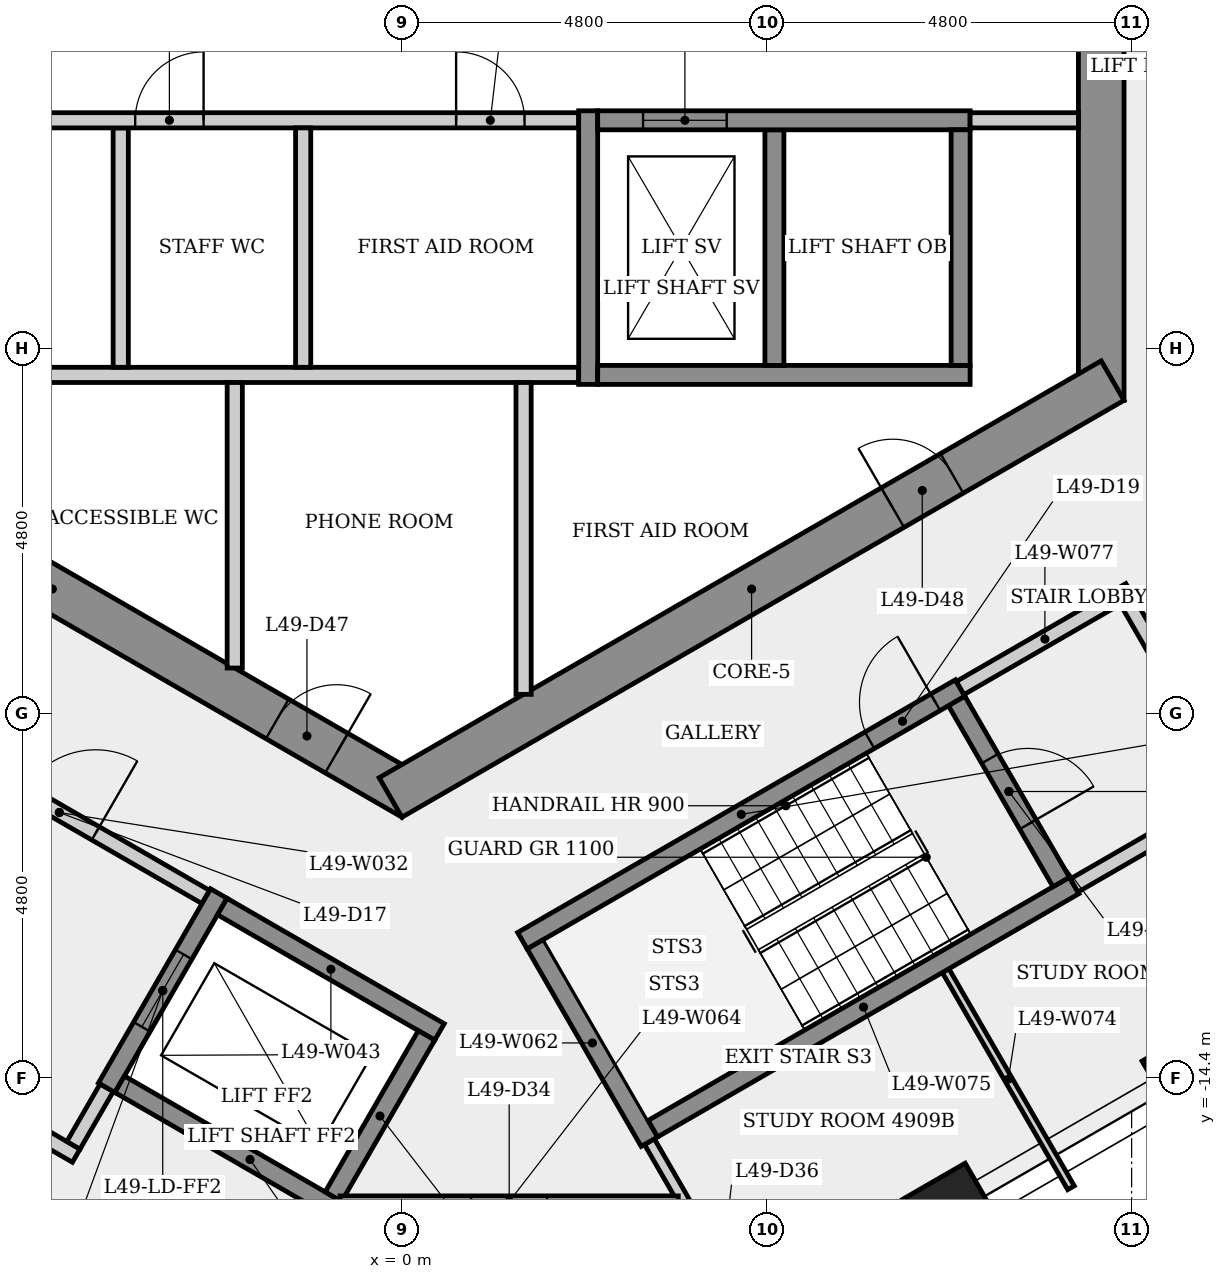
"""IFC4 building model, lengths in metres.
Left out: names, types, materials, properties, quantities, classifications, styles, units other than length and angle.
Written with IfcOpenShell. Run it as: python <this file> out.ifc"""

import sys

from ifc_helpers import new_model, si_unit, direction, frame, frame_2d, origin, origin_2d, place, context, subcontext, project, spatial, rectangle, extrude, element, fill, save


model = new_model("IFC4")
c1 = context("Model", 3, precision=1e-05, world=origin(), true_north=direction((0.0, 1.0)))
c2 = subcontext(c1, "Body", "Model", "MODEL_VIEW")
j1 = project(units=[si_unit("LENGTHUNIT", "METRE"), si_unit("PLANEANGLEUNIT", "RADIAN")], contexts=[c1])
p1 = place(None, origin())
s1 = spatial("IfcSite", under=j1, at=p1, CompositionType="ELEMENT")
p2 = place(p1, origin())
s2 = spatial("IfcBuilding", under=s1, at=p2, CompositionType="ELEMENT")
p3 = place(p2, frame((0.0, 0.0, 183.3)))
s3 = spatial("IfcBuildingStorey", under=s2, at=p3, CompositionType="ELEMENT", Elevation=183.3)
p4 = place(p3, frame((9.2, -5.485, 0.0), z_axis=(0.0, 0.0, 1.0), x_axis=(0.0, 1.0, 0.0)))
e1 = element("IfcWall", 1, at=p4, inside=s3, PredefinedType="SHEAR", context=c2, shape_type="SweptSolid", body=[
    extrude(rectangle(XDim=10.97, YDim=0.6, at=frame_2d((5.485, 0.0))), origin(), (0.0, 0.0, 1.0), 3.4),
])
p5 = place(p4, frame((4.685, 0.0, 0.0)))
e2 = element("IfcOpeningElement", 2, at=p5, cuts=e1, PredefinedType="OPENING", context=c2, shape_type="SweptSolid", body=[
    extrude(rectangle(XDim=1.6, YDim=2.1, at=frame_2d((0.8, 1.05))), frame((0.0, 0.31, 0.0), z_axis=(0.0, -1.0, 0.0), x_axis=(1.0, 0.0, 0.0)), (0.0, 0.0, 1.0), 0.62),
])
p6 = place(p3, frame((-9.35, -5.225, 0.0), z_axis=(0.0, 0.0, 1.0), x_axis=(0.866023993627, -0.500002442456, 0.0)))
e3 = element("IfcWall", 3, at=p6, inside=s3, PredefinedType="SHEAR", context=c2, shape_type="SweptSolid", body=[
    extrude(rectangle(XDim=10.97, YDim=0.6, at=frame_2d((5.485, 0.0))), origin(), (0.0, 0.0, 1.0), 3.4),
])
p7 = place(p6, frame((3.777, 0.0, 0.0)))
e4 = element("IfcOpeningElement", 4, at=p7, cuts=e3, PredefinedType="OPENING", context=c2, shape_type="SweptSolid", body=[
    extrude(rectangle(XDim=0.9, YDim=2.1, at=frame_2d((0.45, 1.05))), frame((0.0, 0.31, 0.0), z_axis=(0.0, -1.0, 0.0), x_axis=(1.0, 0.0, 0.0)), (0.0, 0.0, 1.0), 0.62),
])
p8 = place(p6, frame((8.903, 0.0, 0.0)))
e5 = element("IfcOpeningElement", 5, at=p8, cuts=e3, PredefinedType="OPENING", context=c2, shape_type="SweptSolid", body=[
    extrude(rectangle(XDim=0.9, YDim=2.1, at=frame_2d((0.45, 1.05))), frame((0.0, 0.31, 0.0), z_axis=(0.0, -1.0, 0.0), x_axis=(1.0, 0.0, 0.0)), (0.0, 0.0, 1.0), 0.62),
])
p9 = place(p3, frame((-0.15, -10.71, 0.0), z_axis=(0.0, 0.0, 1.0), x_axis=(0.866023993627, 0.500002442456, 0.0)))
e6 = element("IfcWall", 6, at=p9, inside=s3, PredefinedType="SHEAR", context=c2, shape_type="SweptSolid", body=[
    extrude(rectangle(XDim=10.97, YDim=0.6, at=frame_2d((5.485, 0.0))), origin(), (0.0, 0.0, 1.0), 3.4),
])
p10 = place(p9, frame((7.628, 0.0, 0.0)))
e7 = element("IfcOpeningElement", 7, at=p10, cuts=e6, PredefinedType="OPENING", context=c2, shape_type="SweptSolid", body=[
    extrude(rectangle(XDim=0.9, YDim=2.1, at=frame_2d((0.45, 1.05))), frame((0.0, 0.31, 0.0), z_axis=(0.0, -1.0, 0.0), x_axis=(1.0, 0.0, 0.0)), (0.0, 0.0, 1.0), 0.62),
])
for number, where, z_axis, x_axis in (
    (8, (7.236, -16.171, 0.0), (0.0, 0.0, 1.0), (0.5, -0.866, 0.0)),
    (9, (10.386, -14.352, 0.0), (0.0, 0.0, 1.0), (0.5, -0.866, 0.0)),
):
    element("IfcColumn", number, at=place(p3, frame(where, z_axis=z_axis, x_axis=x_axis)), inside=s3, PredefinedType="COLUMN", context=c2, shape_type="SweptSolid", body=[
        extrude(rectangle(XDim=0.95, YDim=0.95, at=origin_2d()), origin(), (0.0, 0.0, 1.0), 3.4),
    ])
p11 = place(p3, frame((-8.88, -5.15, 0.0), z_axis=(0.0, 0.0, 1.0), x_axis=(1.0, 0.0, 0.0)))
e10 = element("IfcWall", 10, at=p11, inside=s3, PredefinedType="PARTITIONING", context=c2, shape_type="SweptSolid", body=[
    extrude(rectangle(XDim=11.205, YDim=0.2, at=frame_2d((5.603, 0.0))), origin(), (0.0, 0.0, 1.0), 3.0),
])
p12 = place(p3, frame((-8.356, -13.073, 0.0), z_axis=(0.0, 0.0, 1.0), x_axis=(0.866038532462, -0.499977259774, 0.0)))
e11 = element("IfcWall", 11, at=p12, inside=s3, PredefinedType="PARTITIONING", context=c2, shape_type="SweptSolid", body=[
    extrude(rectangle(XDim=4.7, YDim=0.2, at=frame_2d((2.35, 0.0))), origin(), (0.0, 0.0, 1.0), 3.0),
])
p13 = place(p3, frame((-6.435, -9.795, 0.0), z_axis=(0.0, 0.0, 1.0), x_axis=(0.866012907634, -0.500021643343, 0.0)))
e12 = element("IfcWall", 12, at=p13, inside=s3, PredefinedType="PARTITIONING", context=c2, shape_type="SweptSolid", body=[
    extrude(rectangle(XDim=4.45, YDim=0.2, at=frame_2d((2.225, 0.0))), origin(), (0.0, 0.0, 1.0), 3.0),
])
p14 = place(p13, frame((1.675, 0.0, 0.0)))
e13 = element("IfcOpeningElement", 13, at=p14, cuts=e12, PredefinedType="OPENING", context=c2, shape_type="SweptSolid", body=[
    extrude(rectangle(XDim=1.1, YDim=2.1, at=frame_2d((0.55, 1.05))), frame((0.0, 0.11, 0.0), z_axis=(0.0, -1.0, 0.0), x_axis=(1.0, 0.0, 0.0)), (0.0, 0.0, 1.0), 0.22),
])
p15 = place(p3, frame((-3.885, -14.529, 0.0), z_axis=(0.0, 0.0, 1.0), x_axis=(-0.499859285417, -0.866106630146, 0.0)))
e14 = element("IfcWall", 14, at=p15, inside=s3, PredefinedType="PARTITIONING", context=c2, shape_type="SweptSolid", body=[
    extrude(rectangle(XDim=0.875, YDim=0.2, at=frame_2d((0.438, 0.0))), origin(), (0.0, 0.0, 1.0), 3.0),
])
p16 = place(p3, frame((-3.7, -1.9, 0.0), z_axis=(0.0, 0.0, 1.0), x_axis=(0.0, -1.0, 0.0)))
e15 = element("IfcWall", 15, at=p16, inside=s3, PredefinedType="PARTITIONING", context=c2, shape_type="SweptSolid", body=[
    extrude(rectangle(XDim=3.15, YDim=0.2, at=frame_2d((1.575, 0.0))), origin(), (0.0, 0.0, 1.0), 3.0),
])
p17 = place(p3, frame((-8.9, -1.8, 0.0), z_axis=(0.0, 0.0, 1.0), x_axis=(1.0, 0.0, 0.0)))
e16 = element("IfcWall", 16, at=p17, inside=s3, PredefinedType="PARTITIONING", context=c2, shape_type="SweptSolid", body=[
    extrude(rectangle(XDim=11.225, YDim=0.2, at=frame_2d((5.613, 0.0))), origin(), (0.0, 0.0, 1.0), 3.0),
])
p18 = place(p17, frame((2.135, 0.0, 0.0)))
e17 = element("IfcOpeningElement", 17, at=p18, cuts=e16, PredefinedType="OPENING", context=c2, shape_type="SweptSolid", body=[
    extrude(rectangle(XDim=0.9, YDim=2.1, at=frame_2d((0.45, 1.05))), frame((0.0, 0.11, 0.0), z_axis=(0.0, -1.0, 0.0), x_axis=(1.0, 0.0, 0.0)), (0.0, 0.0, 1.0), 0.22),
])
p19 = place(p17, frame((5.39, 0.0, 0.0)))
e18 = element("IfcOpeningElement", 18, at=p19, cuts=e16, PredefinedType="OPENING", context=c2, shape_type="SweptSolid", body=[
    extrude(rectangle(XDim=0.9, YDim=2.1, at=frame_2d((0.45, 1.05))), frame((0.0, 0.11, 0.0), z_axis=(0.0, -1.0, 0.0), x_axis=(1.0, 0.0, 0.0)), (0.0, 0.0, 1.0), 0.22),
])
p20 = place(p17, frame((9.613, 0.0, 0.0)))
e19 = element("IfcOpeningElement", 19, at=p20, cuts=e16, PredefinedType="OPENING", context=c2, shape_type="SweptSolid", body=[
    extrude(rectangle(XDim=0.9, YDim=2.1, at=frame_2d((0.45, 1.05))), frame((0.0, 0.11, 0.0), z_axis=(0.0, -1.0, 0.0), x_axis=(1.0, 0.0, 0.0)), (0.0, 0.0, 1.0), 0.22),
])
p21 = place(p3, frame((-2.41, -11.974, 0.0), z_axis=(0.0, 0.0, 1.0), x_axis=(-0.500001826776, -0.866024349092, 0.0)))
e20 = element("IfcWall", 20, at=p21, inside=s3, PredefinedType="SHEAR", context=c2, shape_type="SweptSolid", body=[
    extrude(rectangle(XDim=2.95, YDim=0.25, at=frame_2d((1.475, 0.0))), origin(), (0.0, 0.0, 1.0), 3.0),
])
p22 = place(p21, frame((0.925, 0.0, 0.0)))
e21 = element("IfcOpeningElement", 21, at=p22, cuts=e20, PredefinedType="OPENING", context=c2, shape_type="SweptSolid", body=[
    extrude(rectangle(XDim=1.1, YDim=2.1, at=frame_2d((0.55, 1.05))), frame((0.0, 0.135, 0.0), z_axis=(0.0, -1.0, 0.0), x_axis=(1.0, 0.0, 0.0)), (0.0, 0.0, 1.0), 0.27),
])
p23 = place(p3, frame((-2.364, -12.145, 0.0), z_axis=(0.0, 0.0, 1.0), x_axis=(0.866040211805, -0.499974350878, 0.0)))
e22 = element("IfcWall", 22, at=p23, inside=s3, PredefinedType="SHEAR", context=c2, shape_type="SweptSolid", body=[
    extrude(rectangle(XDim=3.3, YDim=0.25, at=frame_2d((1.65, 0.0))), origin(), (0.0, 0.0, 1.0), 3.0),
])
p24 = place(p3, frame((-2.2, -5.25, 0.0), z_axis=(0.0, 0.0, 1.0), x_axis=(0.0, -1.0, 0.0)))
e23 = element("IfcWall", 23, at=p24, inside=s3, PredefinedType="PARTITIONING", context=c2, shape_type="SweptSolid", body=[
    extrude(rectangle(XDim=3.757, YDim=0.2, at=frame_2d((1.878, 0.0))), origin(), (0.0, 0.0, 1.0), 3.0),
])
p25 = place(p3, frame((-1.3, -1.9, 0.0), z_axis=(0.0, 0.0, 1.0), x_axis=(0.0, -1.0, 0.0)))
e24 = element("IfcWall", 24, at=p25, inside=s3, PredefinedType="PARTITIONING", context=c2, shape_type="SweptSolid", body=[
    extrude(rectangle(XDim=3.15, YDim=0.2, at=frame_2d((1.575, 0.0))), origin(), (0.0, 0.0, 1.0), 3.0),
])
p26 = place(p3, frame((-0.856, -16.133, 0.0), z_axis=(0.0, 0.0, 1.0), x_axis=(-0.866021716278, 0.500006386895, 0.0)))
e25 = element("IfcWall", 25, at=p26, inside=s3, PredefinedType="SHEAR", context=c2, shape_type="SweptSolid", body=[
    extrude(rectangle(XDim=3.3, YDim=0.25, at=frame_2d((1.65, 0.0))), origin(), (0.0, 0.0, 1.0), 3.0),
])
p27 = place(p3, frame((-0.902, -15.962, 0.0), z_axis=(0.0, 0.0, 1.0), x_axis=(0.500061746146, 0.865989751695, 0.0)))
e26 = element("IfcWall", 26, at=p27, inside=s3, PredefinedType="SHEAR", context=c2, shape_type="SweptSolid", body=[
    extrude(rectangle(XDim=2.45, YDim=0.25, at=frame_2d((1.225, 0.0))), origin(), (0.0, 0.0, 1.0), 3.4),
])
p28 = place(p3, frame((1.6, -5.25, 0.0), z_axis=(0.0, 0.0, 1.0), x_axis=(0.0, -1.0, 0.0)))
e27 = element("IfcWall", 27, at=p28, inside=s3, PredefinedType="PARTITIONING", context=c2, shape_type="SweptSolid", body=[
    extrude(rectangle(XDim=4.103, YDim=0.2, at=frame_2d((2.052, 0.0))), origin(), (0.0, 0.0, 1.0), 3.0),
])
p29 = place(p3, frame((1.585, -12.595, 0.0), z_axis=(0.0, 0.0, 1.0), x_axis=(0.866036417653, 0.499980922934, 0.0)))
e28 = element("IfcWall", 28, at=p29, inside=s3, PredefinedType="SHEAR", context=c2, shape_type="SweptSolid", body=[
    extrude(rectangle(XDim=6.65, YDim=0.25, at=frame_2d((3.325, 0.0))), origin(), (0.0, 0.0, 1.0), 3.0),
])
p30 = place(p29, frame((5.275, 0.0, 0.0)))
e29 = element("IfcOpeningElement", 29, at=p30, cuts=e28, PredefinedType="OPENING", context=c2, shape_type="SweptSolid", body=[
    extrude(rectangle(XDim=1.0, YDim=2.1, at=frame_2d((0.5, 1.05))), frame((0.0, 0.135, 0.0), z_axis=(0.0, -1.0, 0.0), x_axis=(1.0, 0.0, 0.0)), (0.0, 0.0, 1.0), 0.27),
])
p31 = place(p3, frame((2.45, -5.275, 0.0), z_axis=(0.0, 0.0, 1.0), x_axis=(0.0, 1.0, 0.0)))
e30 = element("IfcWall", 30, at=p31, inside=s3, PredefinedType="SHEAR", context=c2, shape_type="SweptSolid", body=[
    extrude(rectangle(XDim=3.6, YDim=0.25, at=frame_2d((1.8, 0.0))), origin(), (0.0, 0.0, 1.0), 3.0),
])
p32 = place(p3, frame((3.256, -15.239, 0.0), z_axis=(0.0, 0.0, 1.0), x_axis=(0.499815364442, -0.866131976934, 0.0)))
e31 = element("IfcWall", 31, at=p32, inside=s3, PredefinedType="PARTITIONING", context=c2, shape_type="SweptSolid", body=[
    extrude(rectangle(XDim=0.986, YDim=0.15, at=frame_2d((0.493, 0.0))), origin(), (0.0, 0.0, 1.0), 3.0),
])
p33 = place(p3, frame((3.256, -15.239, 0.0), z_axis=(0.0, 0.0, 1.0), x_axis=(-0.50002537861, 0.866010750942, 0.0)))
e32 = element("IfcWall", 32, at=p33, inside=s3, PredefinedType="SHEAR", context=c2, shape_type="SweptSolid", body=[
    extrude(rectangle(XDim=3.0, YDim=0.25, at=frame_2d((1.5, 0.0))), origin(), (0.0, 0.0, 1.0), 3.0),
])
p34 = place(p3, frame((3.636, -16.028, 0.0), z_axis=(0.0, 0.0, 1.0), x_axis=(-1.0, 0.0, 0.0)))
e33 = element("IfcWall", 33, at=p34, inside=s3, PredefinedType="PARTITIONING", context=c2, shape_type="SweptSolid", body=[
    extrude(rectangle(XDim=4.451, YDim=0.15, at=frame_2d((2.225, 0.0))), origin(), (0.0, 0.0, 1.0), 3.0),
])
p35 = place(p34, frame((1.725, 0.0, 0.0)))
e34 = element("IfcOpeningElement", 34, at=p35, cuts=e33, PredefinedType="OPENING", context=c2, shape_type="SweptSolid", body=[
    extrude(rectangle(XDim=1.0, YDim=2.1, at=frame_2d((0.5, 1.05))), frame((0.0, 0.085, 0.0), z_axis=(0.0, -1.0, 0.0), x_axis=(1.0, 0.0, 0.0)), (0.0, 0.0, 1.0), 0.17),
])
p36 = place(p3, frame((2.575, -5.15, 0.0), z_axis=(0.0, 0.0, 1.0), x_axis=(1.0, 0.0, 0.0)))
e35 = element("IfcWall", 35, at=p36, inside=s3, PredefinedType="SHEAR", context=c2, shape_type="SweptSolid", body=[
    extrude(rectangle(XDim=4.9, YDim=0.25, at=frame_2d((2.45, 0.0))), origin(), (0.0, 0.0, 1.0), 3.0),
])
p37 = place(p3, frame((4.9, -1.925, 0.0), z_axis=(0.0, 0.0, 1.0), x_axis=(0.0, -1.0, 0.0)))
e36 = element("IfcWall", 36, at=p37, inside=s3, PredefinedType="SHEAR", context=c2, shape_type="SweptSolid", body=[
    extrude(rectangle(XDim=3.1, YDim=0.25, at=frame_2d((1.55, 0.0))), origin(), (0.0, 0.0, 1.0), 3.4),
])
p38 = place(p3, frame((2.575, -1.8, 0.0), z_axis=(0.0, 0.0, 1.0), x_axis=(1.0, 0.0, 0.0)))
e37 = element("IfcWall", 37, at=p38, inside=s3, PredefinedType="SHEAR", context=c2, shape_type="SweptSolid", body=[
    extrude(rectangle(XDim=4.9, YDim=0.25, at=frame_2d((2.45, 0.0))), origin(), (0.0, 0.0, 1.0), 3.0),
])
p39 = place(p38, frame((0.597, 0.0, 0.0)))
e38 = element("IfcOpeningElement", 38, at=p39, cuts=e37, PredefinedType="OPENING", context=c2, shape_type="SweptSolid", body=[
    extrude(rectangle(XDim=1.1, YDim=2.1, at=frame_2d((0.55, 1.05))), frame((0.0, 0.135, 0.0), z_axis=(0.0, -1.0, 0.0), x_axis=(1.0, 0.0, 0.0)), (0.0, 0.0, 1.0), 0.27),
])
p40 = place(p3, frame((7.153, -12.989, 0.0), z_axis=(0.0, 0.0, 1.0), x_axis=(0.500055614084, -0.865993292597, 0.0)))
e39 = element("IfcWall", 39, at=p40, inside=s3, PredefinedType="PARTITIONING", context=c2, shape_type="SweptSolid", body=[
    extrude(rectangle(XDim=3.298, YDim=0.1, at=frame_2d((1.649, 0.0))), origin(), (0.0, 0.0, 1.0), 3.0),
])
p41 = place(p3, frame((3.301, -15.068, 0.0), z_axis=(0.0, 0.0, 1.0), x_axis=(0.866035036182, 0.499983315828, 0.0)))
e40 = element("IfcWall", 40, at=p41, inside=s3, PredefinedType="SHEAR", context=c2, shape_type="SweptSolid", body=[
    extrude(rectangle(XDim=6.4, YDim=0.25, at=frame_2d((3.2, 0.0))), origin(), (0.0, 0.0, 1.0), 3.0),
])
p42 = place(p3, frame((7.298, -9.441, 0.0), z_axis=(0.0, 0.0, 1.0), x_axis=(0.500034990121, -0.866005201286, 0.0)))
e41 = element("IfcWall", 41, at=p42, inside=s3, PredefinedType="SHEAR", context=c2, shape_type="SweptSolid", body=[
    extrude(rectangle(XDim=2.75, YDim=0.25, at=frame_2d((1.375, 0.0))), origin(), (0.0, 0.0, 1.0), 3.0),
])
p43 = place(p42, frame((0.875, 0.0, 0.0)))
e42 = element("IfcOpeningElement", 42, at=p43, cuts=e41, PredefinedType="OPENING", context=c2, shape_type="SweptSolid", body=[
    extrude(rectangle(XDim=1.0, YDim=2.1, at=frame_2d((0.5, 1.05))), frame((0.0, 0.135, 0.0), z_axis=(0.0, -1.0, 0.0), x_axis=(1.0, 0.0, 0.0)), (0.0, 0.0, 1.0), 0.27),
])
p44 = place(p3, frame((7.344, -9.27, 0.0), z_axis=(0.0, 0.0, 1.0), x_axis=(0.866005588531, 0.500034319456, 0.0)))
e43 = element("IfcWall", 43, at=p44, inside=s3, PredefinedType="PARTITIONING", context=c2, shape_type="SweptSolid", body=[
    extrude(rectangle(XDim=2.575, YDim=0.2, at=frame_2d((1.288, 0.0))), origin(), (0.0, 0.0, 1.0), 3.0),
])
p45 = place(p3, frame((7.35, -1.925, 0.0), z_axis=(0.0, 0.0, 1.0), x_axis=(0.0, -1.0, 0.0)))
e44 = element("IfcWall", 44, at=p45, inside=s3, PredefinedType="SHEAR", context=c2, shape_type="SweptSolid", body=[
    extrude(rectangle(XDim=3.1, YDim=0.25, at=frame_2d((1.55, 0.0))), origin(), (0.0, 0.0, 1.0), 3.4),
])
p46 = place(p3, frame((8.9, -1.8, 0.0), z_axis=(0.0, 0.0, 1.0), x_axis=(-1.0, 0.0, 0.0)))
e45 = element("IfcWall", 45, at=p46, inside=s3, PredefinedType="PARTITIONING", context=c2, shape_type="SweptSolid", body=[
    extrude(rectangle(XDim=1.425, YDim=0.2, at=frame_2d((0.712, 0.0))), origin(), (0.0, 0.0, 1.0), 3.0),
])
p47 = place(p3, frame((9.537, -8.119, 0.0), z_axis=(0.0, 0.0, 1.0), x_axis=(0.499990139034, -0.866031096941, 0.0)))
e46 = element("IfcWall", 46, at=p47, inside=s3, PredefinedType="PARTITIONING", context=c2, shape_type="SweptSolid", body=[
    extrude(rectangle(XDim=3.0, YDim=0.2, at=frame_2d((1.5, 0.0))), origin(), (0.0, 0.0, 1.0), 3.0),
])
p48 = place(p47, frame((0.935, 0.0, 0.0)))
e47 = element("IfcOpeningElement", 47, at=p48, cuts=e46, PredefinedType="OPENING", context=c2, shape_type="SweptSolid", body=[
    extrude(rectangle(XDim=1.0, YDim=2.1, at=frame_2d((0.5, 1.05))), frame((0.0, 0.11, 0.0), z_axis=(0.0, -1.0, 0.0), x_axis=(1.0, 0.0, 0.0)), (0.0, 0.0, 1.0), 0.22),
])
p49 = place(p3, frame((10.901, -10.681, 0.0), z_axis=(0.0, 0.0, 1.0), x_axis=(-0.866007538022, -0.500030943131, 0.0)))
e48 = element("IfcWall", 48, at=p49, inside=s3, PredefinedType="PARTITIONING", context=c2, shape_type="SweptSolid", body=[
    extrude(rectangle(XDim=2.375, YDim=0.2, at=frame_2d((1.188, 0.0))), origin(), (0.0, 0.0, 1.0), 3.0),
])
p50 = place(p39, origin())
e49 = element("IfcDoor", 49, at=p50, inside=s3, OperationType="SLIDING_TO_LEFT", PredefinedType="DOOR", context=c2, shape_type="SweptSolid", body=[
    extrude(rectangle(XDim=1.1, YDim=2.1, at=frame_2d((0.55, 1.05))), frame((0.0, 0.025, 0.0), z_axis=(0.0, -1.0, 0.0), x_axis=(1.0, 0.0, 0.0)), (0.0, 0.0, 1.0), 0.05),
])
fill(e38, e49)
p51 = place(p19, origin())
e50 = element("IfcDoor", 50, at=p51, inside=s3, OperationType="SINGLE_SWING_RIGHT", PredefinedType="DOOR", context=c2, shape_type="SweptSolid", body=[
    extrude(rectangle(XDim=0.9, YDim=2.1, at=frame_2d((0.45, 1.05))), frame((0.0, 0.025, 0.0), z_axis=(0.0, -1.0, 0.0), x_axis=(1.0, 0.0, 0.0)), (0.0, 0.0, 1.0), 0.05),
])
fill(e18, e50)
p52 = place(p20, origin())
e51 = element("IfcDoor", 51, at=p52, inside=s3, OperationType="SINGLE_SWING_LEFT", PredefinedType="DOOR", context=c2, shape_type="SweptSolid", body=[
    extrude(rectangle(XDim=0.9, YDim=2.1, at=frame_2d((0.45, 1.05))), frame((0.0, 0.025, 0.0), z_axis=(0.0, -1.0, 0.0), x_axis=(1.0, 0.0, 0.0)), (0.0, 0.0, 1.0), 0.05),
])
fill(e19, e51)
p53 = place(p14, origin())
e52 = element("IfcDoor", 52, at=p53, inside=s3, OperationType="SINGLE_SWING_RIGHT", PredefinedType="DOOR", context=c2, shape_type="SweptSolid", body=[
    extrude(rectangle(XDim=1.1, YDim=2.1, at=frame_2d((0.55, 1.05))), frame((0.0, 0.025, 0.0), z_axis=(0.0, -1.0, 0.0), x_axis=(1.0, 0.0, 0.0)), (0.0, 0.0, 1.0), 0.05),
])
fill(e13, e52)
p54 = place(p22, origin())
e53 = element("IfcDoor", 53, at=p54, inside=s3, OperationType="SLIDING_TO_LEFT", PredefinedType="DOOR", context=c2, shape_type="SweptSolid", body=[
    extrude(rectangle(XDim=1.1, YDim=2.1, at=frame_2d((0.55, 1.05))), frame((0.0, 0.025, 0.0), z_axis=(0.0, -1.0, 0.0), x_axis=(1.0, 0.0, 0.0)), (0.0, 0.0, 1.0), 0.05),
])
fill(e21, e53)
p55 = place(p30, origin())
e54 = element("IfcDoor", 54, at=p55, inside=s3, OperationType="SINGLE_SWING_RIGHT", PredefinedType="DOOR", context=c2, shape_type="SweptSolid", body=[
    extrude(rectangle(XDim=1.0, YDim=2.1, at=frame_2d((0.5, 1.05))), frame((0.0, 0.025, 0.0), z_axis=(0.0, -1.0, 0.0), x_axis=(1.0, 0.0, 0.0)), (0.0, 0.0, 1.0), 0.05),
])
fill(e29, e54)
p56 = place(p43, origin())
e55 = element("IfcDoor", 55, at=p56, inside=s3, OperationType="SINGLE_SWING_RIGHT", PredefinedType="DOOR", context=c2, shape_type="SweptSolid", body=[
    extrude(rectangle(XDim=1.0, YDim=2.1, at=frame_2d((0.5, 1.05))), frame((0.0, 0.025, 0.0), z_axis=(0.0, -1.0, 0.0), x_axis=(1.0, 0.0, 0.0)), (0.0, 0.0, 1.0), 0.05),
])
fill(e42, e55)
p57 = place(p8, origin())
e56 = element("IfcDoor", 56, at=p57, inside=s3, OperationType="SINGLE_SWING_RIGHT", PredefinedType="DOOR", context=c2, shape_type="SweptSolid", body=[
    extrude(rectangle(XDim=0.9, YDim=2.1, at=frame_2d((0.45, 1.05))), frame((0.0, 0.025, 0.0), z_axis=(0.0, -1.0, 0.0), x_axis=(1.0, 0.0, 0.0)), (0.0, 0.0, 1.0), 0.05),
])
fill(e5, e56)
p58 = place(p10, origin())
e57 = element("IfcDoor", 57, at=p58, inside=s3, OperationType="SINGLE_SWING_LEFT", PredefinedType="DOOR", context=c2, shape_type="SweptSolid", body=[
    extrude(rectangle(XDim=0.9, YDim=2.1, at=frame_2d((0.45, 1.05))), frame((0.0, 0.025, 0.0), z_axis=(0.0, -1.0, 0.0), x_axis=(1.0, 0.0, 0.0)), (0.0, 0.0, 1.0), 0.05),
])
fill(e7, e57)
save(model, sys.argv[1])
